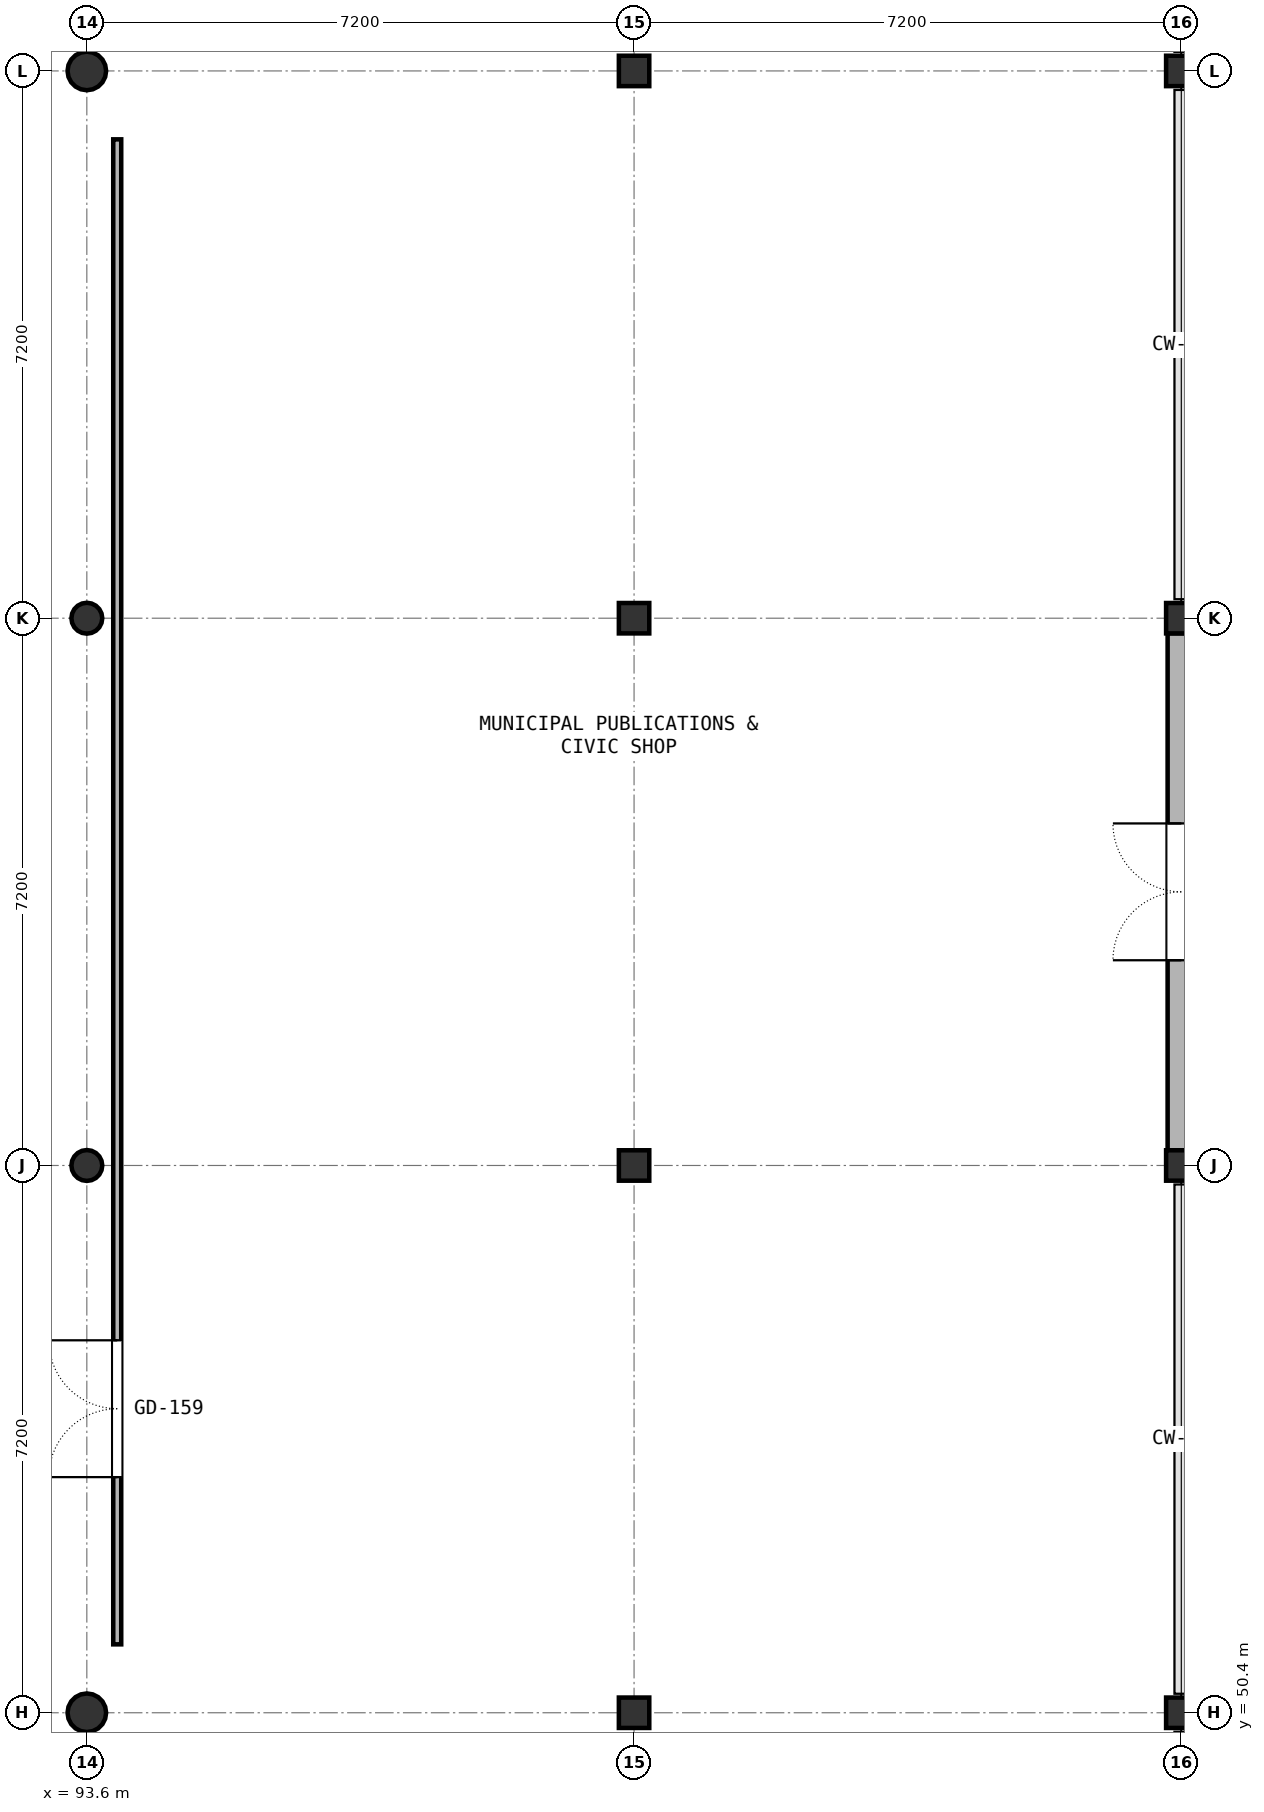
"""IFC4 building model, lengths in metres.
Left out: names, types, materials, properties, quantities, classifications, styles, units other than length and angle.
Written with IfcOpenShell. Run it as: python <this file> out.ifc"""

import sys

from ifc_helpers import new_model, si_unit, direction, frame, frame_2d, origin, origin_2d, place, context, subcontext, project, spatial, rectangle, hollow_circle, i_section, extrude, element, fill, save


model = new_model("IFC4")
c1 = context("Model", 3, precision=1e-05, world=origin(), true_north=direction((0.0, 1.0)))
c2 = subcontext(c1, "Body", "Model", "MODEL_VIEW")
j1 = project(units=[si_unit("LENGTHUNIT", "METRE"), si_unit("PLANEANGLEUNIT", "RADIAN")], contexts=[c1])
p1 = place(None, origin())
s1 = spatial("IfcSite", under=j1, at=p1, CompositionType="ELEMENT")
p2 = place(p1, origin())
s2 = spatial("IfcBuilding", under=s1, at=p2, CompositionType="ELEMENT")
p3 = place(p2, origin())
s3 = spatial("IfcBuildingStorey", under=s2, at=p3, CompositionType="ELEMENT", Elevation=0.0)
p4 = place(p3, frame((93.6, 50.4, 0.0), z_axis=(0.0, 0.0, 1.0), x_axis=(1.0, 0.0, 0.0)))
e1 = element("IfcColumn", 1, at=p4, inside=s3, PredefinedType="COLUMN", context=c2, shape_type="SweptSolid", body=[
    extrude(hollow_circle(Radius=0.254, WallThickness=0.016, at=origin_2d()), origin(), (0.0, 0.0, 1.0), 5.4),
])
for number, where, z_axis, x_axis in (
    (2, (93.6, 57.6, 0.0), (0.0, 0.0, 1.0), (1.0, 0.0, 0.0)),
    (3, (93.6, 64.8, 0.0), (0.0, 0.0, 1.0), (1.0, 0.0, 0.0)),
):
    element("IfcColumn", number, at=place(p3, frame(where, z_axis=z_axis, x_axis=x_axis)), inside=s3, PredefinedType="COLUMN", context=c2, shape_type="SweptSolid", body=[
        extrude(hollow_circle(Radius=0.203, WallThickness=0.014, at=origin_2d()), origin(), (0.0, 0.0, 1.0), 5.4),
    ])
p5 = place(p3, frame((93.6, 72.0, 0.0), z_axis=(0.0, 0.0, 1.0), x_axis=(1.0, 0.0, 0.0)))
e4 = element("IfcColumn", 4, at=p5, inside=s3, PredefinedType="COLUMN", context=c2, shape_type="SweptSolid", body=[
    extrude(hollow_circle(Radius=0.254, WallThickness=0.016, at=origin_2d()), origin(), (0.0, 0.0, 1.0), 5.4),
])
for number, where, z_axis, x_axis in (
    (5, (100.8, 50.4, 0.0), (0.0, 0.0, 1.0), (1.0, 0.0, 0.0)),
    (6, (100.8, 57.6, 0.0), (0.0, 0.0, 1.0), (1.0, 0.0, 0.0)),
    (7, (100.8, 64.8, 0.0), (0.0, 0.0, 1.0), (1.0, 0.0, 0.0)),
    (8, (100.8, 72.0, 0.0), (0.0, 0.0, 1.0), (1.0, 0.0, 0.0)),
    (9, (108.0, 50.4, 0.0), (0.0, 0.0, 1.0), (1.0, 0.0, 0.0)),
    (10, (108.0, 57.6, 0.0), (0.0, 0.0, 1.0), (1.0, 0.0, 0.0)),
    (11, (108.0, 64.8, 0.0), (0.0, 0.0, 1.0), (1.0, 0.0, 0.0)),
    (12, (108.0, 72.0, 0.0), (0.0, 0.0, 1.0), (1.0, 0.0, 0.0)),
):
    element("IfcColumn", number, at=place(p3, frame(where, z_axis=z_axis, x_axis=x_axis)), inside=s3, PredefinedType="COLUMN", context=c2, shape_type="SweptSolid", body=[
        extrude(i_section(OverallWidth=0.4, OverallDepth=0.4, WebThickness=0.013, FlangeThickness=0.021, FilletRadius=0.022, at=origin_2d()), origin(), (0.0, 0.0, 1.0), 5.4),
    ])
p6 = place(p3, frame((108.0, 64.602, 0.0), z_axis=(0.0, 0.0, 1.0), x_axis=(0.0, -1.0, 0.0)))
e13 = element("IfcWall", 13, at=p6, inside=s3, PredefinedType="SOLIDWALL", context=c2, shape_type="SweptSolid", body=[
    extrude(rectangle(XDim=6.804, YDim=0.36, at=frame_2d((3.402, 0.0))), origin(), (0.0, 0.0, 1.0), 4.4),
])
p7 = place(p6, frame((2.502, 0.0, 0.0)))
e14 = element("IfcOpeningElement", 14, at=p7, cuts=e13, PredefinedType="OPENING", context=c2, shape_type="SweptSolid", body=[
    extrude(rectangle(XDim=1.8, YDim=2.35, at=frame_2d((0.9, 1.175))), frame((0.0, 0.19, 0.0), z_axis=(0.0, -1.0, 0.0), x_axis=(1.0, 0.0, 0.0)), (0.0, 0.0, 1.0), 0.38),
])
p8 = place(p3, frame((94.0, 51.3, 0.0), z_axis=(0.0, 0.0, 1.0), x_axis=(0.0, 1.0, 0.0)))
e15 = element("IfcWall", 15, at=p8, inside=s3, PredefinedType="PARTITIONING", context=c2, shape_type="SweptSolid", body=[
    extrude(rectangle(XDim=19.8, YDim=0.105, at=frame_2d((9.9, 0.0))), origin(), (0.0, 0.0, 1.0), 4.12),
])
p9 = place(p8, frame((2.2, 0.0, 0.0)))
e16 = element("IfcOpeningElement", 16, at=p9, cuts=e15, PredefinedType="OPENING", context=c2, shape_type="SweptSolid", body=[
    extrude(rectangle(XDim=1.8, YDim=2.2, at=frame_2d((0.9, 1.1))), frame((0.0, 0.062, 0.0), z_axis=(0.0, -1.0, 0.0), x_axis=(1.0, 0.0, 0.0)), (0.0, 0.0, 1.0), 0.125),
])
p10 = place(p7, frame((1.8, 0.0, 0.0), z_axis=(0.0, 0.0, 1.0), x_axis=(-1.0, 0.0, 0.0)))
e17 = element("IfcDoor", 17, at=p10, inside=s3, OperationType="DOUBLE_DOOR_SINGLE_SWING", PredefinedType="DOOR", context=c2, shape_type="SweptSolid", body=[
    extrude(rectangle(XDim=1.8, YDim=2.35, at=frame_2d((0.9, 1.175))), frame((0.0, 0.025, 0.0), z_axis=(0.0, -1.0, 0.0), x_axis=(1.0, 0.0, 0.0)), (0.0, 0.0, 1.0), 0.05),
])
fill(e14, e17)
p11 = place(p9, origin())
e18 = element("IfcDoor", 18, at=p11, inside=s3, OperationType="DOUBLE_DOOR_SINGLE_SWING", PredefinedType="DOOR", context=c2, shape_type="SweptSolid", body=[
    extrude(rectangle(XDim=1.8, YDim=2.2, at=frame_2d((0.9, 1.1))), frame((0.0, 0.025, 0.0), z_axis=(0.0, -1.0, 0.0), x_axis=(1.0, 0.0, 0.0)), (0.0, 0.0, 1.0), 0.05),
])
fill(e16, e18)
save(model, sys.argv[1])
